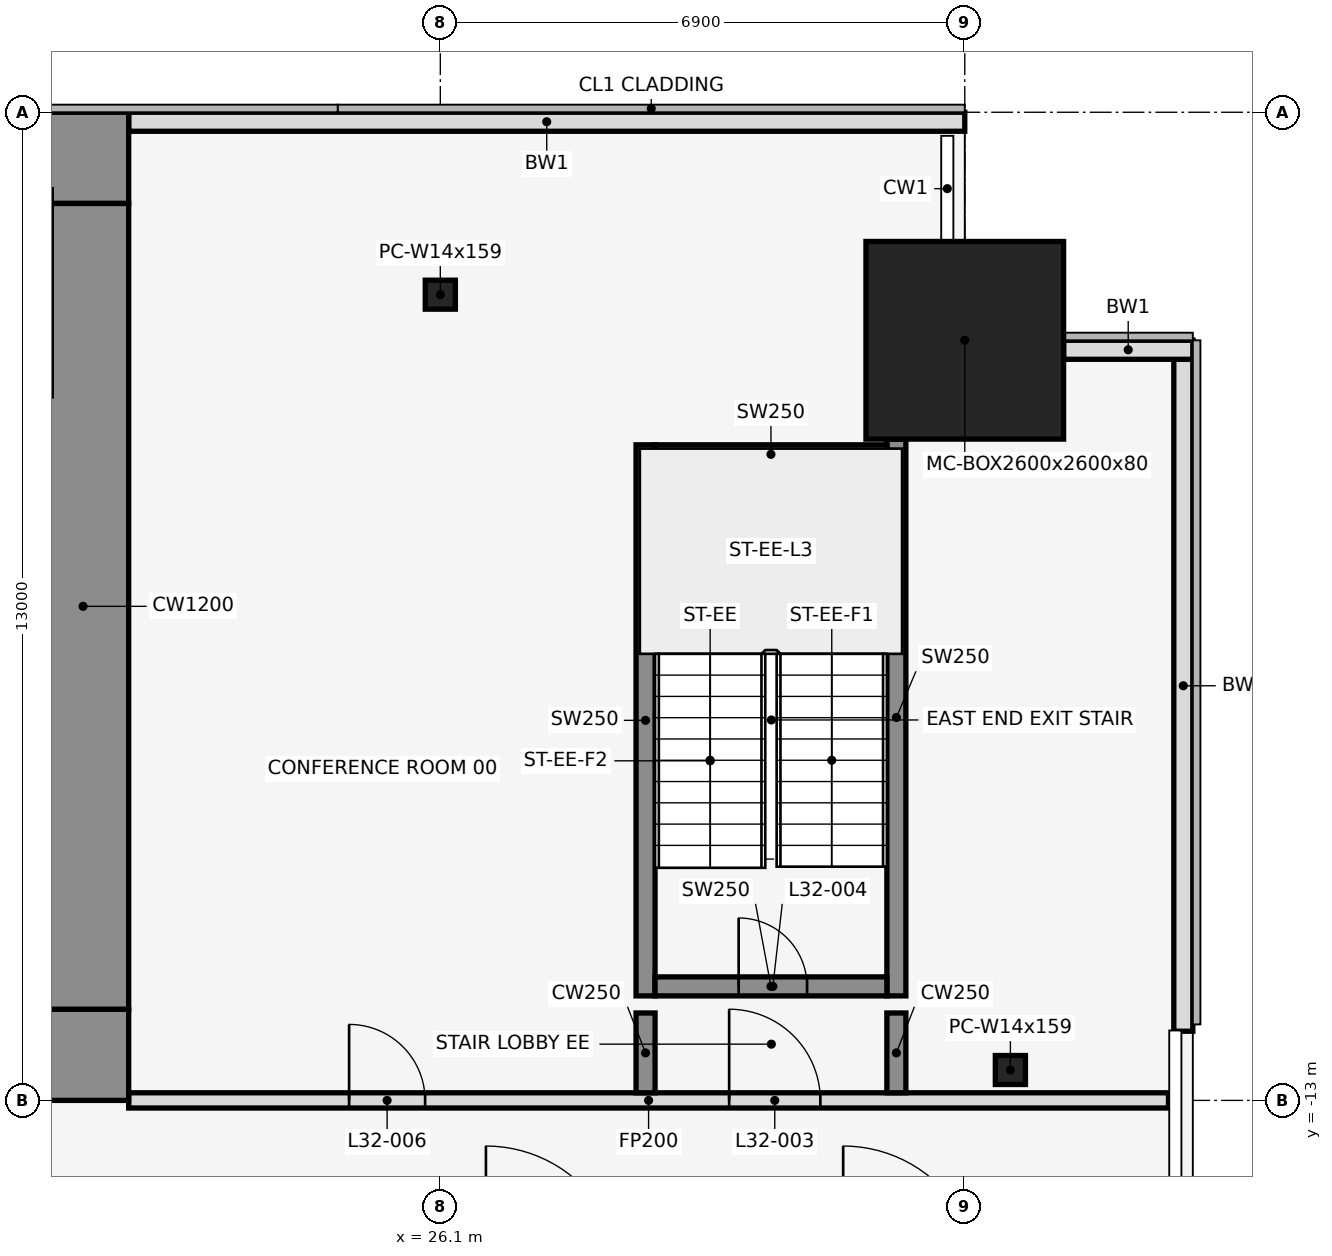
"""IFC4 building model, lengths in metres.
Left out: names, types, materials, properties, quantities, classifications, styles, units other than length and angle.
Written with IfcOpenShell. Run it as: python <this file> out.ifc"""

import sys

from ifc_helpers import new_model, si_unit, direction, frame, frame_2d, origin, origin_2d, place, context, subcontext, project, spatial, rectangle, hollow_rectangle, i_section, extrude, element, fill, save


model = new_model("IFC4")
c1 = context("Model", 3, precision=1e-05, world=origin(), true_north=direction((0.0, 1.0)))
c2 = subcontext(c1, "Body", "Model", "MODEL_VIEW")
j1 = project(units=[si_unit("LENGTHUNIT", "METRE"), si_unit("PLANEANGLEUNIT", "RADIAN")], contexts=[c1])
p1 = place(None, origin())
s1 = spatial("IfcSite", under=j1, at=p1, CompositionType="ELEMENT")
p2 = place(p1, origin())
s2 = spatial("IfcBuilding", under=s1, at=p2, CompositionType="ELEMENT")
p3 = place(p2, frame((0.0, 0.0, 148.6)))
s3 = spatial("IfcBuildingStorey", under=s2, at=p3, CompositionType="ELEMENT", Elevation=148.6)
p4 = place(p3, frame((26.1, -2.4, 0.0), z_axis=(0.0, 0.0, 1.0), x_axis=(1.0, 0.0, 0.0)))
e1 = element("IfcColumn", 1, at=p4, inside=s3, PredefinedType="COLUMN", context=c2, shape_type="SweptSolid", body=[
    extrude(i_section(OverallWidth=0.396, OverallDepth=0.381, WebThickness=0.019, FlangeThickness=0.03, at=origin_2d()), origin(), (0.0, 0.0, 1.0), 4.1),
])
p5 = place(p3, frame((33.0, -3.0, 0.0), z_axis=(0.0, 0.0, 1.0), x_axis=(1.0, 0.0, 0.0)))
e2 = element("IfcColumn", 2, at=p5, inside=s3, PredefinedType="COLUMN", context=c2, shape_type="SweptSolid", body=[
    extrude(hollow_rectangle(XDim=2.6, YDim=2.6, WallThickness=0.08, at=origin_2d()), origin(), (0.0, 0.0, 1.0), 4.1),
])
p6 = place(p3, frame((33.6, -12.6, 0.0), z_axis=(0.0, 0.0, 1.0), x_axis=(1.0, 0.0, 0.0)))
e3 = element("IfcColumn", 3, at=p6, inside=s3, PredefinedType="COLUMN", context=c2, shape_type="SweptSolid", body=[
    extrude(i_section(OverallWidth=0.396, OverallDepth=0.381, WebThickness=0.019, FlangeThickness=0.03, at=origin_2d()), origin(), (0.0, 0.0, 1.0), 4.1),
])
p7 = place(p3, frame((33.0, -0.125, 0.0), z_axis=(0.0, 0.0, 1.0), x_axis=(-1.0, 0.0, 0.0)))
e4 = element("IfcWall", 4, at=p7, inside=s3, PredefinedType="STANDARD", context=c2, shape_type="SweptSolid", body=[
    extrude(rectangle(XDim=11.0, YDim=0.25, at=frame_2d((5.5, 0.0))), origin(), (0.0, 0.0, 1.0), 3.95),
])
p8 = place(p3, frame((35.875, -12.09, 0.0), z_axis=(0.0, 0.0, 1.0), x_axis=(0.0, 1.0, 0.0)))
e5 = element("IfcWall", 5, at=p8, inside=s3, PredefinedType="STANDARD", context=c2, shape_type="SweptSolid", body=[
    extrude(rectangle(XDim=9.09, YDim=0.25, at=frame_2d((4.545, 0.0))), origin(), (0.0, 0.0, 1.0), 3.95),
])
p9 = place(p3, frame((36.0, -3.125, 0.0), z_axis=(0.0, 0.0, 1.0), x_axis=(-1.0, 0.0, 0.0)))
e6 = element("IfcWall", 6, at=p9, inside=s3, PredefinedType="STANDARD", context=c2, shape_type="SweptSolid", body=[
    extrude(rectangle(XDim=1.7, YDim=0.25, at=frame_2d((0.85, 0.0))), origin(), (0.0, 0.0, 1.0), 3.95),
])
p10 = place(p3, frame((28.8, -11.625, 0.0), z_axis=(0.0, 0.0, 1.0), x_axis=(0.0, 1.0, 0.0)))
e7 = element("IfcWall", 7, at=p10, inside=s3, PredefinedType="SHEAR", context=c2, shape_type="SweptSolid", body=[
    extrude(rectangle(XDim=7.25, YDim=0.25, at=frame_2d((3.625, 0.0))), origin(), (0.0, 0.0, 1.0), 4.1),
])
p11 = place(p3, frame((32.1, -11.625, 0.0), z_axis=(0.0, 0.0, 1.0), x_axis=(0.0, 1.0, 0.0)))
e8 = element("IfcWall", 8, at=p11, inside=s3, PredefinedType="SHEAR", context=c2, shape_type="SweptSolid", body=[
    extrude(rectangle(XDim=7.325, YDim=0.25, at=frame_2d((3.663, 0.0))), origin(), (0.0, 0.0, 1.0), 4.1),
])
p12 = place(p3, frame((28.925, -11.5, 0.0), z_axis=(0.0, 0.0, 1.0), x_axis=(1.0, 0.0, 0.0)))
e9 = element("IfcWall", 9, at=p12, inside=s3, PredefinedType="SHEAR", context=c2, shape_type="SweptSolid", body=[
    extrude(rectangle(XDim=3.05, YDim=0.25, at=frame_2d((1.525, 0.0))), origin(), (0.0, 0.0, 1.0), 4.1),
])
p13 = place(p12, frame((1.1, 0.0, 0.0)))
e10 = element("IfcOpeningElement", 10, at=p13, cuts=e9, PredefinedType="OPENING", context=c2, shape_type="SweptSolid", body=[
    extrude(rectangle(XDim=0.9, YDim=2.1, at=frame_2d((0.45, 1.05))), frame((0.0, 0.137, 0.0), z_axis=(0.0, -1.0, 0.0), x_axis=(1.0, 0.0, 0.0)), (0.0, 0.0, 1.0), 0.274),
])
p14 = place(p3, frame((28.925, -4.5, 0.0), z_axis=(0.0, 0.0, 1.0), x_axis=(1.0, 0.0, 0.0)))
e11 = element("IfcWall", 11, at=p14, inside=s3, PredefinedType="SHEAR", context=c2, shape_type="SweptSolid", body=[
    extrude(rectangle(XDim=3.05, YDim=0.25, at=frame_2d((1.525, 0.0))), origin(), (0.0, 0.0, 1.0), 4.1),
])
p15 = place(p3, frame((22.0, -13.0, 0.0), z_axis=(0.0, 0.0, 1.0), x_axis=(1.0, 0.0, 0.0)))
e12 = element("IfcWall", 12, at=p15, inside=s3, PredefinedType="PARTITIONING", context=c2, shape_type="SweptSolid", body=[
    extrude(rectangle(XDim=13.68, YDim=0.2, at=frame_2d((6.84, 0.0))), origin(), (0.0, 0.0, 1.0), 2.84),
])
p16 = place(p15, frame((7.9, 0.0, 0.0)))
e13 = element("IfcOpeningElement", 13, at=p16, cuts=e12, PredefinedType="OPENING", context=c2, shape_type="SweptSolid", body=[
    extrude(rectangle(XDim=1.2, YDim=2.1, at=frame_2d((0.6, 1.05))), frame((0.0, 0.112, 0.0), z_axis=(0.0, -1.0, 0.0), x_axis=(1.0, 0.0, 0.0)), (0.0, 0.0, 1.0), 0.224),
])
p17 = place(p15, frame((2.9, 0.0, 0.0)))
e14 = element("IfcOpeningElement", 14, at=p17, cuts=e12, PredefinedType="OPENING", context=c2, shape_type="SweptSolid", body=[
    extrude(rectangle(XDim=1.0, YDim=2.1, at=frame_2d((0.5, 1.05))), frame((0.0, 0.112, 0.0), z_axis=(0.0, -1.0, 0.0), x_axis=(1.0, 0.0, 0.0)), (0.0, 0.0, 1.0), 0.224),
])
for number, where, z_axis, x_axis in (
    (15, (28.8, -12.9, 0.0), (0.0, 0.0, 1.0), (0.0, 1.0, 0.0)),
    (16, (32.1, -12.9, 0.0), (0.0, 0.0, 1.0), (0.0, 1.0, 0.0)),
):
    element("IfcWall", number, at=place(p3, frame(where, z_axis=z_axis, x_axis=x_axis)), inside=s3, PredefinedType="SHEAR", context=c2, shape_type="SweptSolid", body=[
        extrude(rectangle(XDim=1.05, YDim=0.25, at=frame_2d((0.525, 0.0))), origin(), (0.0, 0.0, 1.0), 4.1),
    ])
p18 = place(p3, frame((-22.0, -0.6, 0.0), z_axis=(0.0, 0.0, 1.0), x_axis=(1.0, 0.0, 0.0)))
e17 = element("IfcWall", 17, at=p18, inside=s3, PredefinedType="SHEAR", context=c2, shape_type="SweptSolid", body=[
    extrude(rectangle(XDim=44.0, YDim=1.2, at=frame_2d((22.0, 0.0))), origin(), (0.0, 0.0, 1.0), 4.1),
])
p19 = place(p18, frame((18.55, 0.0, 0.0)))
e18 = element("IfcOpeningElement", 18, at=p19, cuts=e17, PredefinedType="OPENING", context=c2, shape_type="SweptSolid", body=[
    extrude(rectangle(XDim=0.9, YDim=2.1, at=frame_2d((0.45, 1.05))), frame((0.0, 0.612, 0.0), z_axis=(0.0, -1.0, 0.0), x_axis=(1.0, 0.0, 0.0)), (0.0, 0.0, 1.0), 1.224),
])
p20 = place(p18, frame((24.55, 0.0, 0.0)))
e19 = element("IfcOpeningElement", 19, at=p20, cuts=e17, PredefinedType="OPENING", context=c2, shape_type="SweptSolid", body=[
    extrude(rectangle(XDim=0.9, YDim=2.1, at=frame_2d((0.45, 1.05))), frame((0.0, 0.612, 0.0), z_axis=(0.0, -1.0, 0.0), x_axis=(1.0, 0.0, 0.0)), (0.0, 0.0, 1.0), 1.224),
])
p21 = place(p3, frame((-22.0, -12.4, 0.0), z_axis=(0.0, 0.0, 1.0), x_axis=(1.0, 0.0, 0.0)))
e20 = element("IfcWall", 20, at=p21, inside=s3, PredefinedType="SHEAR", context=c2, shape_type="SweptSolid", body=[
    extrude(rectangle(XDim=44.0, YDim=1.2, at=frame_2d((22.0, 0.0))), origin(), (0.0, 0.0, 1.0), 4.1),
])
p22 = place(p21, frame((2.2, 0.0, 0.0)))
e21 = element("IfcOpeningElement", 21, at=p22, cuts=e20, PredefinedType="OPENING", context=c2, shape_type="SweptSolid", body=[
    extrude(rectangle(XDim=1.2, YDim=2.1, at=frame_2d((0.6, 1.05))), frame((0.0, 0.612, 0.0), z_axis=(0.0, -1.0, 0.0), x_axis=(1.0, 0.0, 0.0)), (0.0, 0.0, 1.0), 1.224),
])
p23 = place(p21, frame((21.4, 0.0, 0.0)))
e22 = element("IfcOpeningElement", 22, at=p23, cuts=e20, PredefinedType="OPENING", context=c2, shape_type="SweptSolid", body=[
    extrude(rectangle(XDim=1.2, YDim=2.1, at=frame_2d((0.6, 1.05))), frame((0.0, 0.612, 0.0), z_axis=(0.0, -1.0, 0.0), x_axis=(1.0, 0.0, 0.0)), (0.0, 0.0, 1.0), 1.224),
])
p24 = place(p21, frame((40.6, 0.0, 0.0)))
e23 = element("IfcOpeningElement", 23, at=p24, cuts=e20, PredefinedType="OPENING", context=c2, shape_type="SweptSolid", body=[
    extrude(rectangle(XDim=1.2, YDim=2.1, at=frame_2d((0.6, 1.05))), frame((0.0, 0.612, 0.0), z_axis=(0.0, -1.0, 0.0), x_axis=(1.0, 0.0, 0.0)), (0.0, 0.0, 1.0), 1.224),
])
p25 = place(p21, frame((16.0, 0.0, 0.0)))
e24 = element("IfcOpeningElement", 24, at=p25, cuts=e20, PredefinedType="OPENING", context=c2, shape_type="SweptSolid", body=[
    extrude(rectangle(XDim=1.8, YDim=2.1, at=frame_2d((0.9, 1.05))), frame((0.0, 0.612, 0.0), z_axis=(0.0, -1.0, 0.0), x_axis=(1.0, 0.0, 0.0)), (0.0, 0.0, 1.0), 1.224),
])
p26 = place(p21, frame((6.3, 0.0, 0.0)))
e25 = element("IfcOpeningElement", 25, at=p26, cuts=e20, PredefinedType="OPENING", context=c2, shape_type="SweptSolid", body=[
    extrude(rectangle(XDim=1.2, YDim=2.1, at=frame_2d((0.6, 1.05))), frame((0.0, 0.612, 0.0), z_axis=(0.0, -1.0, 0.0), x_axis=(1.0, 0.0, 0.0)), (0.0, 0.0, 1.0), 1.224),
])
p27 = place(p21, frame((26.2, 0.0, 0.0)))
e26 = element("IfcOpeningElement", 26, at=p27, cuts=e20, PredefinedType="OPENING", context=c2, shape_type="SweptSolid", body=[
    extrude(rectangle(XDim=1.8, YDim=2.1, at=frame_2d((0.9, 1.05))), frame((0.0, 0.612, 0.0), z_axis=(0.0, -1.0, 0.0), x_axis=(1.0, 0.0, 0.0)), (0.0, 0.0, 1.0), 1.224),
])
p28 = place(p21, frame((36.5, 0.0, 0.0)))
e27 = element("IfcOpeningElement", 27, at=p28, cuts=e20, PredefinedType="OPENING", context=c2, shape_type="SweptSolid", body=[
    extrude(rectangle(XDim=1.2, YDim=2.1, at=frame_2d((0.6, 1.05))), frame((0.0, 0.612, 0.0), z_axis=(0.0, -1.0, 0.0), x_axis=(1.0, 0.0, 0.0)), (0.0, 0.0, 1.0), 1.224),
])
p29 = place(p3, frame((21.4, -11.8, 0.0), z_axis=(0.0, 0.0, 1.0), x_axis=(0.0, 1.0, 0.0)))
e28 = element("IfcWall", 28, at=p29, inside=s3, PredefinedType="SHEAR", context=c2, shape_type="SweptSolid", body=[
    extrude(rectangle(XDim=10.6, YDim=1.2, at=frame_2d((5.3, 0.0))), origin(), (0.0, 0.0, 1.0), 4.1),
])
p30 = place(p16, origin())
e29 = element("IfcDoor", 29, at=p30, inside=s3, OperationType="SINGLE_SWING_RIGHT", PredefinedType="DOOR", context=c2, shape_type="SweptSolid", body=[
    extrude(rectangle(XDim=1.2, YDim=2.1, at=frame_2d((0.6, 1.05))), frame((0.0, 0.025, 0.0), z_axis=(0.0, -1.0, 0.0), x_axis=(1.0, 0.0, 0.0)), (0.0, 0.0, 1.0), 0.05),
])
fill(e13, e29)
p31 = place(p13, origin())
e30 = element("IfcDoor", 30, at=p31, inside=s3, OperationType="SINGLE_SWING_LEFT", PredefinedType="DOOR", context=c2, shape_type="SweptSolid", body=[
    extrude(rectangle(XDim=0.9, YDim=2.1, at=frame_2d((0.45, 1.05))), frame((0.0, 0.025, 0.0), z_axis=(0.0, -1.0, 0.0), x_axis=(1.0, 0.0, 0.0)), (0.0, 0.0, 1.0), 0.05),
])
fill(e10, e30)
p32 = place(p17, origin())
e31 = element("IfcDoor", 31, at=p32, inside=s3, OperationType="SINGLE_SWING_RIGHT", PredefinedType="DOOR", context=c2, shape_type="SweptSolid", body=[
    extrude(rectangle(XDim=1.0, YDim=2.1, at=frame_2d((0.5, 1.05))), frame((0.0, 0.025, 0.0), z_axis=(0.0, -1.0, 0.0), x_axis=(1.0, 0.0, 0.0)), (0.0, 0.0, 1.0), 0.05),
])
fill(e14, e31)
save(model, sys.argv[1])
